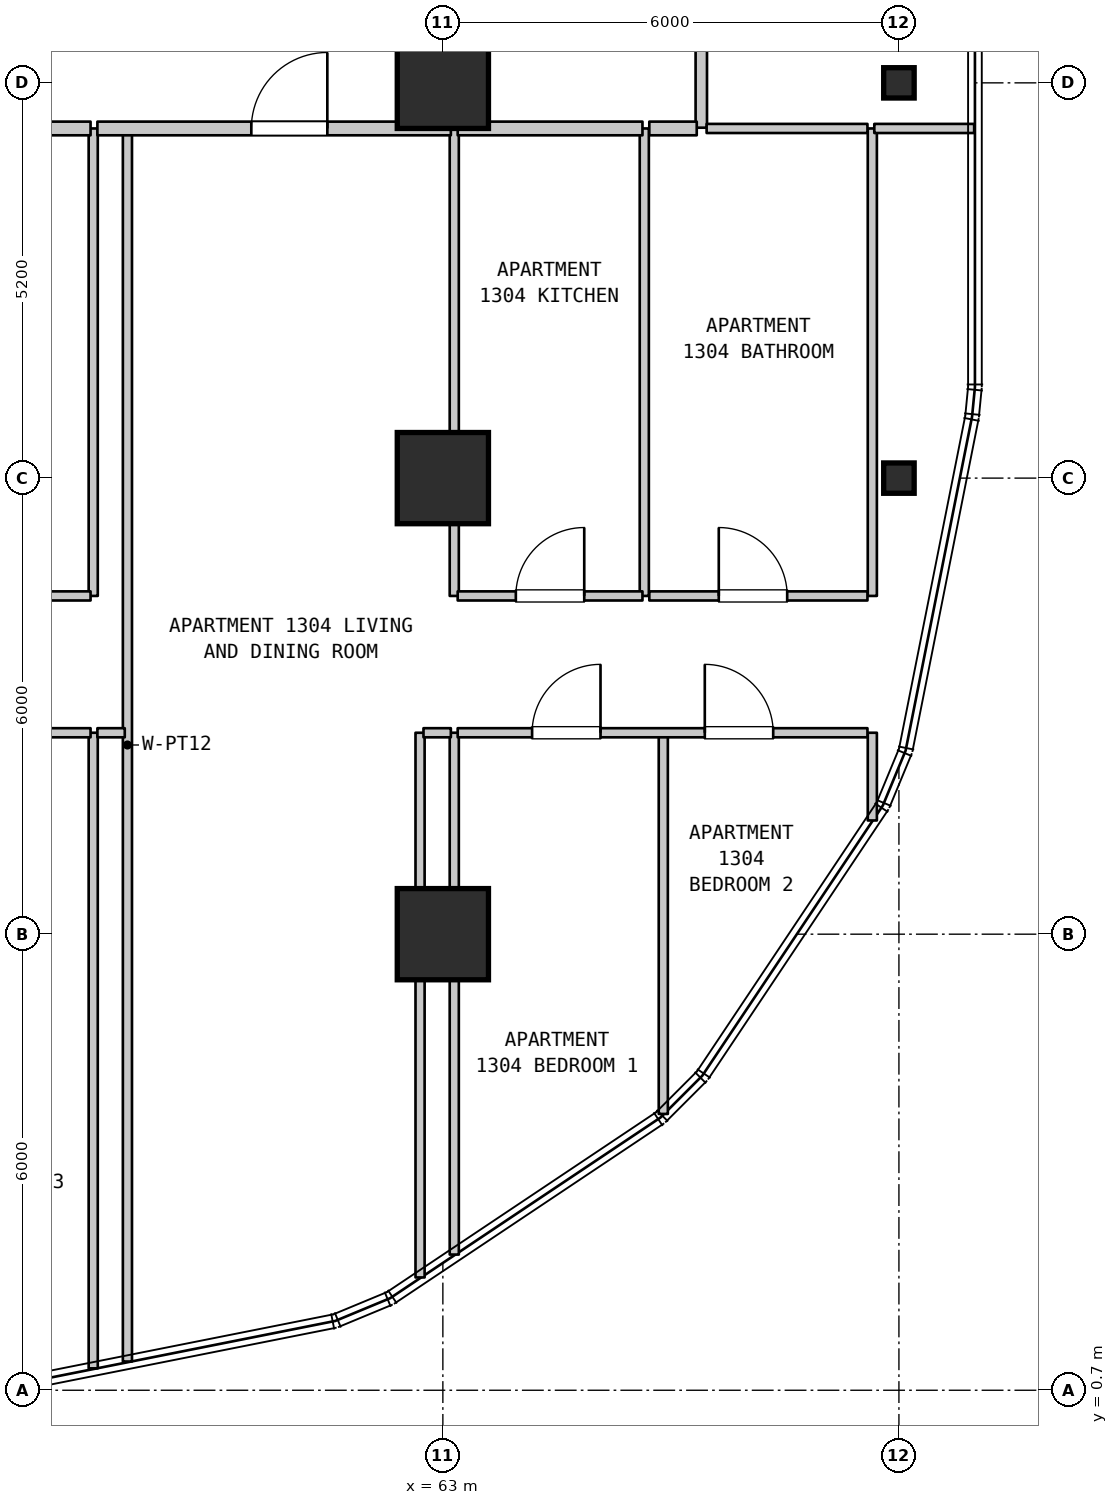
"""IFC4 building model, lengths in metres.
Left out: names, types, materials, properties, quantities, classifications, styles, units other than length and angle.
Written with IfcOpenShell. Run it as: python <this file> out.ifc"""

import sys

from ifc_helpers import new_model, si_unit, direction, frame, frame_2d, origin, origin_2d, place, context, subcontext, project, spatial, rectangle, i_section, extrude, element, fill, save


model = new_model("IFC4")
c1 = context("Model", 3, precision=1e-05, world=origin(), true_north=direction((0.0, 1.0)))
c2 = subcontext(c1, "Body", "Model", "MODEL_VIEW")
j1 = project(units=[si_unit("LENGTHUNIT", "METRE"), si_unit("PLANEANGLEUNIT", "RADIAN")], contexts=[c1])
p1 = place(None, origin())
s1 = spatial("IfcSite", under=j1, at=p1, CompositionType="ELEMENT")
p2 = place(p1, origin())
s2 = spatial("IfcBuilding", under=s1, at=p2, CompositionType="ELEMENT")
p3 = place(p2, frame((0.0, 0.0, 57.3)))
s3 = spatial("IfcBuildingStorey", under=s2, at=p3, CompositionType="ELEMENT", Elevation=57.3)
for number, where, z_axis, x_axis in (
    (1, (63.0, 6.7, 0.0), (0.0, 0.0, 1.0), (1.0, 0.0, 0.0)),
    (2, (63.0, 12.7, 0.0), (0.0, 0.0, 1.0), (1.0, 0.0, 0.0)),
    (3, (63.0, 17.9, 0.0), (0.0, 0.0, 1.0), (1.0, 0.0, 0.0)),
):
    element("IfcColumn", number, at=place(p3, frame(where, z_axis=z_axis, x_axis=x_axis)), inside=s3, PredefinedType="COLUMN", context=c2, shape_type="SweptSolid", body=[
        extrude(rectangle(XDim=1.2, YDim=1.2, at=origin_2d()), origin(), (0.0, 0.0, 1.0), 3.7),
    ])
for number, where, z_axis, x_axis in (
    (4, (69.0, 12.7, 0.0), (0.0, 0.0, 1.0), (1.0, 0.0, 0.0)),
    (5, (69.0, 17.9, 0.0), (0.0, 0.0, 1.0), (1.0, 0.0, 0.0)),
):
    element("IfcColumn", number, at=place(p3, frame(where, z_axis=z_axis, x_axis=x_axis)), inside=s3, PredefinedType="COLUMN", context=c2, shape_type="SweptSolid", body=[
        extrude(i_section(OverallWidth=0.401, OverallDepth=0.399, WebThickness=0.025, FlangeThickness=0.04, FilletRadius=0.015, at=origin_2d()), origin(), (0.0, 0.0, 1.0), 3.7),
    ])
p4 = place(p3, frame((58.4, 0.988, 0.0), z_axis=(0.0, 0.0, 1.0), x_axis=(0.0, 1.0, 0.0)))
e6 = element("IfcWall", 6, at=p4, inside=s3, PredefinedType="PARTITIONING", context=c2, shape_type="SweptSolid", body=[
    extrude(rectangle(XDim=8.362, YDim=0.12, at=frame_2d((4.181, 0.0))), origin(), (0.0, 0.0, 1.0), 3.28),
])
p5 = place(p3, frame((58.4, 11.15, 0.0), z_axis=(0.0, 0.0, 1.0), x_axis=(0.0, 1.0, 0.0)))
e7 = element("IfcWall", 7, at=p5, inside=s3, PredefinedType="PARTITIONING", context=c2, shape_type="SweptSolid", body=[
    extrude(rectangle(XDim=6.15, YDim=0.12, at=frame_2d((3.075, 0.0))), origin(), (0.0, 0.0, 1.0), 3.28),
])
p6 = place(p3, frame((58.85, 1.078, 0.0), z_axis=(0.0, 0.0, 1.0), x_axis=(0.0, 1.0, 0.0)))
e8 = element("IfcWall", 8, at=p6, inside=s3, PredefinedType="PARTITIONING", context=c2, shape_type="SweptSolid", body=[
    extrude(rectangle(XDim=16.222, YDim=0.12, at=frame_2d((8.111, 0.0))), origin(), (0.0, 0.0, 1.0), 3.28),
])
p7 = place(p3, frame((62.7, 2.184, 0.0), z_axis=(0.0, 0.0, 1.0), x_axis=(0.0, 1.0, 0.0)))
e9 = element("IfcWall", 9, at=p7, inside=s3, PredefinedType="PARTITIONING", context=c2, shape_type="SweptSolid", body=[
    extrude(rectangle(XDim=7.166, YDim=0.12, at=frame_2d((3.583, 0.0))), origin(), (0.0, 0.0, 1.0), 3.28),
])
p8 = place(p3, frame((63.15, 2.485, 0.0), z_axis=(0.0, 0.0, 1.0), x_axis=(0.0, 1.0, 0.0)))
e10 = element("IfcWall", 10, at=p8, inside=s3, PredefinedType="PARTITIONING", context=c2, shape_type="SweptSolid", body=[
    extrude(rectangle(XDim=6.865, YDim=0.12, at=frame_2d((3.433, 0.0))), origin(), (0.0, 0.0, 1.0), 3.28),
])
for number, where, z_axis, x_axis in (
    (11, (63.15, 11.15, 0.0), (0.0, 0.0, 1.0), (0.0, 1.0, 0.0)),
    (12, (65.65, 11.15, 0.0), (0.0, 0.0, 1.0), (0.0, 1.0, 0.0)),
):
    element("IfcWall", number, at=place(p3, frame(where, z_axis=z_axis, x_axis=x_axis)), inside=s3, PredefinedType="PARTITIONING", context=c2, shape_type="SweptSolid", body=[
        extrude(rectangle(XDim=6.15, YDim=0.12, at=frame_2d((3.075, 0.0))), origin(), (0.0, 0.0, 1.0), 3.28),
    ])
p9 = place(p3, frame((65.9, 4.335, 0.0), z_axis=(0.0, 0.0, 1.0), x_axis=(0.0, 1.0, 0.0)))
e13 = element("IfcWall", 13, at=p9, inside=s3, PredefinedType="PARTITIONING", context=c2, shape_type="SweptSolid", body=[
    extrude(rectangle(XDim=5.015, YDim=0.12, at=frame_2d((2.508, 0.0))), origin(), (0.0, 0.0, 1.0), 3.28),
])
p10 = place(p3, frame((66.4, 17.31, 0.0), z_axis=(0.0, 0.0, 1.0), x_axis=(0.0, 1.0, 0.0)))
e14 = element("IfcWall", 14, at=p10, inside=s3, PredefinedType="STANDARD", context=c2, shape_type="SweptSolid", body=[
    extrude(rectangle(XDim=2.19, YDim=0.15, at=frame_2d((1.095, 0.0))), origin(), (0.0, 0.0, 1.0), 3.28),
])
p11 = place(p3, frame((68.65, 8.196, 0.0), z_axis=(0.0, 0.0, 1.0), x_axis=(0.0, 1.0, 0.0)))
e15 = element("IfcWall", 15, at=p11, inside=s3, PredefinedType="PARTITIONING", context=c2, shape_type="SweptSolid", body=[
    extrude(rectangle(XDim=1.154, YDim=0.12, at=frame_2d((0.577, 0.0))), origin(), (0.0, 0.0, 1.0), 3.28),
])
p12 = place(p3, frame((68.65, 11.15, 0.0), z_axis=(0.0, 0.0, 1.0), x_axis=(0.0, 1.0, 0.0)))
e16 = element("IfcWall", 16, at=p12, inside=s3, PredefinedType="PARTITIONING", context=c2, shape_type="SweptSolid", body=[
    extrude(rectangle(XDim=6.15, YDim=0.12, at=frame_2d((3.075, 0.0))), origin(), (0.0, 0.0, 1.0), 3.28),
])
p13 = place(p3, frame((49.795, 9.35, 0.0), z_axis=(0.0, 0.0, 1.0), x_axis=(1.0, 0.0, 0.0)))
e17 = element("IfcWall", 17, at=p13, inside=s3, PredefinedType="PARTITIONING", context=c2, shape_type="SweptSolid", body=[
    extrude(rectangle(XDim=8.57, YDim=0.12, at=frame_2d((4.285, 0.0))), origin(), (0.0, 0.0, 1.0), 3.28),
])
p14 = place(p13, frame((1.124, 0.0, 0.0)))
e18 = element("IfcOpeningElement", 18, at=p14, cuts=e17, PredefinedType="OPENING", context=c2, shape_type="SweptSolid", body=[
    extrude(rectangle(XDim=0.9, YDim=2.15, at=frame_2d((0.45, 1.075))), frame((0.0, 0.07, 0.0), z_axis=(0.0, -1.0, 0.0), x_axis=(1.0, 0.0, 0.0)), (0.0, 0.0, 1.0), 0.14),
])
p15 = place(p13, frame((3.835, 0.0, 0.0)))
e19 = element("IfcOpeningElement", 19, at=p15, cuts=e17, PredefinedType="OPENING", context=c2, shape_type="SweptSolid", body=[
    extrude(rectangle(XDim=0.9, YDim=2.15, at=frame_2d((0.45, 1.075))), frame((0.0, 0.07, 0.0), z_axis=(0.0, -1.0, 0.0), x_axis=(1.0, 0.0, 0.0)), (0.0, 0.0, 1.0), 0.14),
])
p16 = place(p13, frame((6.547, 0.0, 0.0)))
e20 = element("IfcOpeningElement", 20, at=p16, cuts=e17, PredefinedType="OPENING", context=c2, shape_type="SweptSolid", body=[
    extrude(rectangle(XDim=0.9, YDim=2.15, at=frame_2d((0.45, 1.075))), frame((0.0, 0.07, 0.0), z_axis=(0.0, -1.0, 0.0), x_axis=(1.0, 0.0, 0.0)), (0.0, 0.0, 1.0), 0.14),
])
for number, where, z_axis, x_axis in (
    (21, (58.455, 9.35, 0.0), (0.0, 0.0, 1.0), (1.0, 0.0, 0.0)),
    (22, (62.745, 9.35, 0.0), (0.0, 0.0, 1.0), (1.0, 0.0, 0.0)),
):
    element("IfcWall", number, at=place(p3, frame(where, z_axis=z_axis, x_axis=x_axis)), inside=s3, PredefinedType="PARTITIONING", context=c2, shape_type="SweptSolid", body=[
        extrude(rectangle(XDim=0.36, YDim=0.12, at=frame_2d((0.18, 0.0))), origin(), (0.0, 0.0, 1.0), 3.28),
    ])
p17 = place(p3, frame((63.195, 9.35, 0.0), z_axis=(0.0, 0.0, 1.0), x_axis=(1.0, 0.0, 0.0)))
e23 = element("IfcWall", 23, at=p17, inside=s3, PredefinedType="PARTITIONING", context=c2, shape_type="SweptSolid", body=[
    extrude(rectangle(XDim=5.391, YDim=0.12, at=frame_2d((2.695, 0.0))), origin(), (0.0, 0.0, 1.0), 3.28),
])
p18 = place(p17, frame((0.979, 0.0, 0.0)))
e24 = element("IfcOpeningElement", 24, at=p18, cuts=e23, PredefinedType="OPENING", context=c2, shape_type="SweptSolid", body=[
    extrude(rectangle(XDim=0.9, YDim=2.15, at=frame_2d((0.45, 1.075))), frame((0.0, 0.07, 0.0), z_axis=(0.0, -1.0, 0.0), x_axis=(1.0, 0.0, 0.0)), (0.0, 0.0, 1.0), 0.14),
])
p19 = place(p17, frame((3.251, 0.0, 0.0)))
e25 = element("IfcOpeningElement", 25, at=p19, cuts=e23, PredefinedType="OPENING", context=c2, shape_type="SweptSolid", body=[
    extrude(rectangle(XDim=0.9, YDim=2.15, at=frame_2d((0.45, 1.075))), frame((0.0, 0.07, 0.0), z_axis=(0.0, -1.0, 0.0), x_axis=(1.0, 0.0, 0.0)), (0.0, 0.0, 1.0), 0.14),
])
p20 = place(p3, frame((54.974, 11.15, 0.0), z_axis=(0.0, 0.0, 1.0), x_axis=(1.0, 0.0, 0.0)))
e26 = element("IfcWall", 26, at=p20, inside=s3, PredefinedType="PARTITIONING", context=c2, shape_type="SweptSolid", body=[
    extrude(rectangle(XDim=3.391, YDim=0.12, at=frame_2d((1.695, 0.0))), origin(), (0.0, 0.0, 1.0), 3.28),
])
p21 = place(p20, frame((0.12, 0.0, 0.0)))
e27 = element("IfcOpeningElement", 27, at=p21, cuts=e26, PredefinedType="OPENING", context=c2, shape_type="SweptSolid", body=[
    extrude(rectangle(XDim=0.9, YDim=2.15, at=frame_2d((0.45, 1.075))), frame((0.0, 0.07, 0.0), z_axis=(0.0, -1.0, 0.0), x_axis=(1.0, 0.0, 0.0)), (0.0, 0.0, 1.0), 0.14),
])
p22 = place(p3, frame((63.195, 11.15, 0.0), z_axis=(0.0, 0.0, 1.0), x_axis=(1.0, 0.0, 0.0)))
e28 = element("IfcWall", 28, at=p22, inside=s3, PredefinedType="PARTITIONING", context=c2, shape_type="SweptSolid", body=[
    extrude(rectangle(XDim=2.431, YDim=0.12, at=frame_2d((1.215, 0.0))), origin(), (0.0, 0.0, 1.0), 3.28),
])
p23 = place(p22, frame((0.765, 0.0, 0.0)))
e29 = element("IfcOpeningElement", 29, at=p23, cuts=e28, PredefinedType="OPENING", context=c2, shape_type="SweptSolid", body=[
    extrude(rectangle(XDim=0.9, YDim=2.15, at=frame_2d((0.45, 1.075))), frame((0.0, 0.07, 0.0), z_axis=(0.0, -1.0, 0.0), x_axis=(1.0, 0.0, 0.0)), (0.0, 0.0, 1.0), 0.14),
])
p24 = place(p3, frame((65.716, 11.15, 0.0), z_axis=(0.0, 0.0, 1.0), x_axis=(1.0, 0.0, 0.0)))
e30 = element("IfcWall", 30, at=p24, inside=s3, PredefinedType="PARTITIONING", context=c2, shape_type="SweptSolid", body=[
    extrude(rectangle(XDim=2.87, YDim=0.12, at=frame_2d((1.435, 0.0))), origin(), (0.0, 0.0, 1.0), 3.28),
])
p25 = place(p24, frame((0.914, 0.0, 0.0)))
e31 = element("IfcOpeningElement", 31, at=p25, cuts=e30, PredefinedType="OPENING", context=c2, shape_type="SweptSolid", body=[
    extrude(rectangle(XDim=0.9, YDim=2.1, at=frame_2d((0.45, 1.05))), frame((0.0, 0.07, 0.0), z_axis=(0.0, -1.0, 0.0), x_axis=(1.0, 0.0, 0.0)), (0.0, 0.0, 1.0), 0.14),
])
p26 = place(p3, frame((54.974, 17.3, 0.0), z_axis=(0.0, 0.0, 1.0), x_axis=(1.0, 0.0, 0.0)))
e32 = element("IfcWall", 32, at=p26, inside=s3, PredefinedType="STANDARD", context=c2, shape_type="SweptSolid", body=[
    extrude(rectangle(XDim=3.391, YDim=0.18, at=frame_2d((1.695, 0.0))), origin(), (0.0, 0.0, 1.0), 3.28),
])
p27 = place(p3, frame((58.455, 17.3, 0.0), z_axis=(0.0, 0.0, 1.0), x_axis=(1.0, 0.0, 0.0)))
e33 = element("IfcWall", 33, at=p27, inside=s3, PredefinedType="STANDARD", context=c2, shape_type="SweptSolid", body=[
    extrude(rectangle(XDim=4.65, YDim=0.18, at=frame_2d((2.325, 0.0))), origin(), (0.0, 0.0, 1.0), 3.28),
])
p28 = place(p27, frame((2.025, 0.0, 0.0)))
e34 = element("IfcOpeningElement", 34, at=p28, cuts=e33, PredefinedType="OPENING", context=c2, shape_type="SweptSolid", body=[
    extrude(rectangle(XDim=1.0, YDim=2.15, at=frame_2d((0.5, 1.075))), frame((0.0, 0.1, 0.0), z_axis=(0.0, -1.0, 0.0), x_axis=(1.0, 0.0, 0.0)), (0.0, 0.0, 1.0), 0.2),
])
p29 = place(p3, frame((63.195, 17.3, 0.0), z_axis=(0.0, 0.0, 1.0), x_axis=(1.0, 0.0, 0.0)))
e35 = element("IfcWall", 35, at=p29, inside=s3, PredefinedType="STANDARD", context=c2, shape_type="SweptSolid", body=[
    extrude(rectangle(XDim=2.431, YDim=0.18, at=frame_2d((1.215, 0.0))), origin(), (0.0, 0.0, 1.0), 3.28),
])
p30 = place(p3, frame((65.716, 17.3, 0.0), z_axis=(0.0, 0.0, 1.0), x_axis=(1.0, 0.0, 0.0)))
e36 = element("IfcWall", 36, at=p30, inside=s3, PredefinedType="STANDARD", context=c2, shape_type="SweptSolid", body=[
    extrude(rectangle(XDim=0.624, YDim=0.18, at=frame_2d((0.312, 0.0))), origin(), (0.0, 0.0, 1.0), 3.28),
])
p31 = place(p3, frame((66.47, 17.3, 0.0), z_axis=(0.0, 0.0, 1.0), x_axis=(1.0, 0.0, 0.0)))
e37 = element("IfcWall", 37, at=p31, inside=s3, PredefinedType="PARTITIONING", context=c2, shape_type="SweptSolid", body=[
    extrude(rectangle(XDim=2.116, YDim=0.12, at=frame_2d((1.058, 0.0))), origin(), (0.0, 0.0, 1.0), 3.28),
])
p32 = place(p3, frame((68.676, 17.3, 0.0), z_axis=(0.0, 0.0, 1.0), x_axis=(1.0, 0.0, 0.0)))
e38 = element("IfcWall", 38, at=p32, inside=s3, PredefinedType="PARTITIONING", context=c2, shape_type="SweptSolid", body=[
    extrude(rectangle(XDim=1.314, YDim=0.12, at=frame_2d((0.657, 0.0))), origin(), (0.0, 0.0, 1.0), 3.28),
])
p33 = place(p18, origin())
e39 = element("IfcDoor", 39, at=p33, inside=s3, OperationType="SINGLE_SWING_RIGHT", PredefinedType="DOOR", context=c2, shape_type="SweptSolid", body=[
    extrude(rectangle(XDim=0.9, YDim=2.15, at=frame_2d((0.45, 1.075))), frame((0.0, 0.025, 0.0), z_axis=(0.0, -1.0, 0.0), x_axis=(1.0, 0.0, 0.0)), (0.0, 0.0, 1.0), 0.05),
])
fill(e24, e39)
p34 = place(p19, origin())
e40 = element("IfcDoor", 40, at=p34, inside=s3, OperationType="SINGLE_SWING_LEFT", PredefinedType="DOOR", context=c2, shape_type="SweptSolid", body=[
    extrude(rectangle(XDim=0.9, YDim=2.15, at=frame_2d((0.45, 1.075))), frame((0.0, 0.025, 0.0), z_axis=(0.0, -1.0, 0.0), x_axis=(1.0, 0.0, 0.0)), (0.0, 0.0, 1.0), 0.05),
])
fill(e25, e40)
p35 = place(p23, origin())
e41 = element("IfcDoor", 41, at=p35, inside=s3, OperationType="SINGLE_SWING_RIGHT", PredefinedType="DOOR", context=c2, shape_type="SweptSolid", body=[
    extrude(rectangle(XDim=0.9, YDim=2.15, at=frame_2d((0.45, 1.075))), frame((0.0, 0.025, 0.0), z_axis=(0.0, -1.0, 0.0), x_axis=(1.0, 0.0, 0.0)), (0.0, 0.0, 1.0), 0.05),
])
fill(e29, e41)
p36 = place(p25, origin())
e42 = element("IfcDoor", 42, at=p36, inside=s3, OperationType="SINGLE_SWING_LEFT", PredefinedType="DOOR", context=c2, shape_type="SweptSolid", body=[
    extrude(rectangle(XDim=0.9, YDim=2.1, at=frame_2d((0.45, 1.05))), frame((0.0, 0.025, 0.0), z_axis=(0.0, -1.0, 0.0), x_axis=(1.0, 0.0, 0.0)), (0.0, 0.0, 1.0), 0.05),
])
fill(e31, e42)
p37 = place(p28, origin())
e43 = element("IfcDoor", 43, at=p37, inside=s3, OperationType="SINGLE_SWING_RIGHT", PredefinedType="DOOR", context=c2, shape_type="SweptSolid", body=[
    extrude(rectangle(XDim=1.0, YDim=2.15, at=frame_2d((0.5, 1.075))), frame((0.0, 0.025, 0.0), z_axis=(0.0, -1.0, 0.0), x_axis=(1.0, 0.0, 0.0)), (0.0, 0.0, 1.0), 0.05),
])
fill(e34, e43)
save(model, sys.argv[1])
